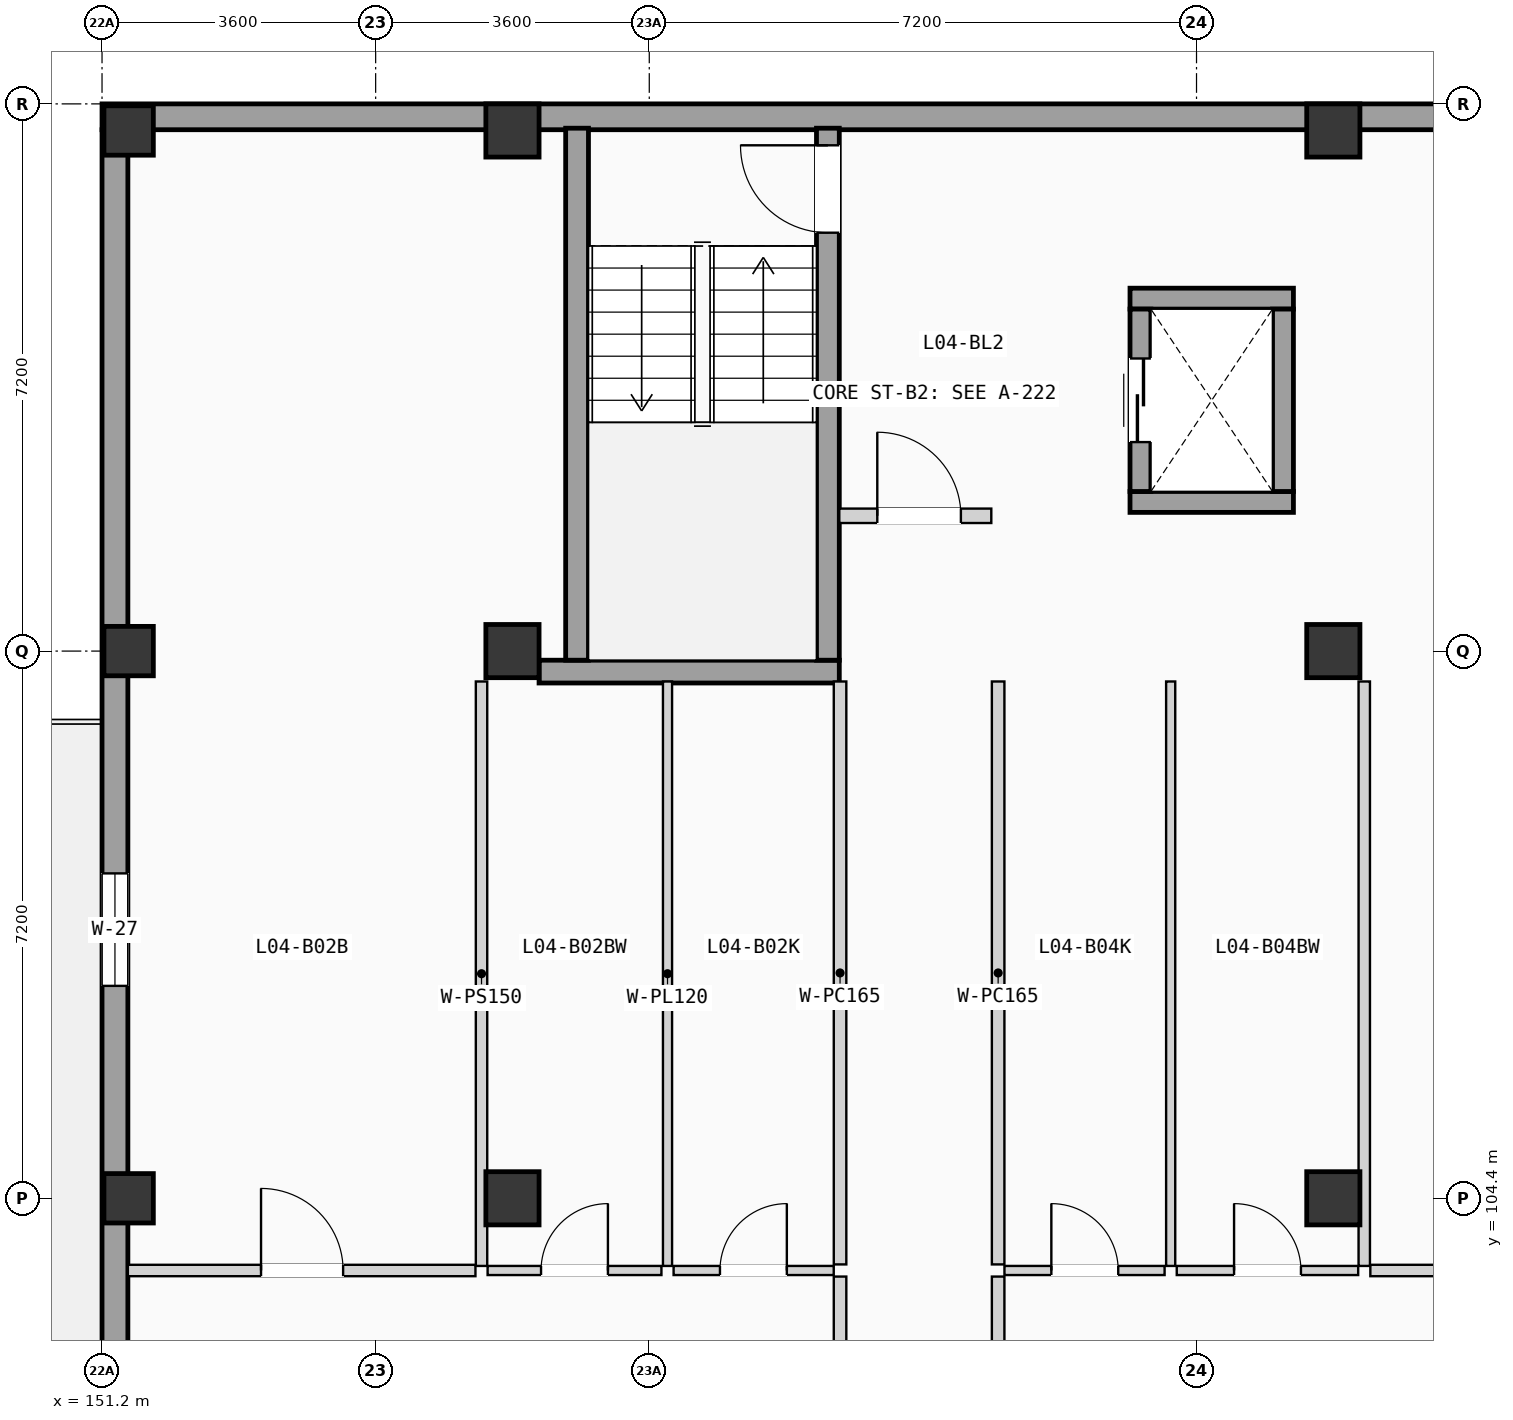
"""IFC4 building model, lengths in metres.
Left out: names, types, materials, properties, quantities, classifications, styles, units other than length and angle.
Written with IfcOpenShell. Run it as: python <this file> out.ifc"""

import sys

from ifc_helpers import new_model, si_unit, direction, frame, frame_2d, origin, origin_2d, place, context, subcontext, project, spatial, rectangle, extrude, element, fill, save


model = new_model("IFC4")
c1 = context("Model", 3, precision=1e-05, world=origin(), true_north=direction((0.0, 1.0)))
c2 = subcontext(c1, "Body", "Model", "MODEL_VIEW")
j1 = project(units=[si_unit("LENGTHUNIT", "METRE"), si_unit("PLANEANGLEUNIT", "RADIAN")], contexts=[c1])
p1 = place(None, origin())
s1 = spatial("IfcSite", under=j1, at=p1, CompositionType="ELEMENT")
p2 = place(p1, origin())
s2 = spatial("IfcBuilding", under=s1, at=p2, CompositionType="ELEMENT")
p3 = place(p2, frame((0.0, 0.0, 15.225)))
s3 = spatial("IfcBuildingStorey", under=s2, at=p3, CompositionType="ELEMENT", Elevation=15.225)
for number, where, z_axis, x_axis in (
    (1, (151.55, 104.4, 0.0), (0.0, 0.0, 1.0), (1.0, 0.0, 0.0)),
    (2, (151.55, 111.6, 0.0), (0.0, 0.0, 1.0), (1.0, 0.0, 0.0)),
    (3, (151.55, 118.45, 0.0), (0.0, 0.0, 1.0), (1.0, 0.0, 0.0)),
):
    element("IfcColumn", number, at=place(p3, frame(where, z_axis=z_axis, x_axis=x_axis)), inside=s3, PredefinedType="COLUMN", context=c2, shape_type="SweptSolid", body=[
        extrude(rectangle(XDim=0.65, YDim=0.65, at=origin_2d()), origin(), (0.0, 0.0, 1.0), 3.15),
    ])
for number, where, z_axis, x_axis in (
    (4, (156.6, 104.4, 0.0), (0.0, 0.0, 1.0), (1.0, 0.0, 0.0)),
    (5, (156.6, 111.6, 0.0), (0.0, 0.0, 1.0), (1.0, 0.0, 0.0)),
    (6, (156.6, 118.45, 0.0), (0.0, 0.0, 1.0), (1.0, 0.0, 0.0)),
    (7, (167.4, 104.4, 0.0), (0.0, 0.0, 1.0), (1.0, 0.0, 0.0)),
    (8, (167.4, 111.6, 0.0), (0.0, 0.0, 1.0), (1.0, 0.0, 0.0)),
    (9, (167.4, 118.45, 0.0), (0.0, 0.0, 1.0), (1.0, 0.0, 0.0)),
):
    element("IfcColumn", number, at=place(p3, frame(where, z_axis=z_axis, x_axis=x_axis)), inside=s3, PredefinedType="COLUMN", context=c2, shape_type="SweptSolid", body=[
        extrude(rectangle(XDim=0.7, YDim=0.7, at=origin_2d()), origin(), (0.0, 0.0, 1.0), 3.15),
    ])
p4 = place(p3, frame((151.2, 118.63, 0.0), z_axis=(0.0, 0.0, 1.0), x_axis=(1.0, 0.0, 0.0)))
e10 = element("IfcWall", 10, at=p4, inside=s3, PredefinedType="SOLIDWALL", context=c2, shape_type="SweptSolid", body=[
    extrude(rectangle(XDim=21.6, YDim=0.34, at=frame_2d((10.8, 0.0))), origin(), (0.0, 0.0, 1.0), 2.89),
])
p5 = place(p3, frame((151.37, 68.74, 0.0), z_axis=(0.0, 0.0, 1.0), x_axis=(0.0, 1.0, 0.0)))
e11 = element("IfcWall", 11, at=p5, inside=s3, PredefinedType="SOLIDWALL", context=c2, shape_type="SweptSolid", body=[
    extrude(rectangle(XDim=49.72, YDim=0.34, at=frame_2d((24.86, 0.0))), origin(), (0.0, 0.0, 1.0), 2.89),
])
p6 = place(p5, frame((15.765, 0.0, 0.0)))
e12 = element("IfcOpeningElement", 12, at=p6, cuts=e11, PredefinedType="OPENING", context=c2, shape_type="SweptSolid", body=[
    extrude(rectangle(XDim=0.95, YDim=2.15, at=frame_2d((0.475, 1.075))), frame((0.0, 0.18, 0.0), z_axis=(0.0, -1.0, 0.0), x_axis=(1.0, 0.0, 0.0)), (0.0, 0.0, 1.0), 0.36),
])
p7 = place(p5, frame((8.823, 0.0, 0.555)))
e13 = element("IfcOpeningElement", 13, at=p7, cuts=e11, PredefinedType="OPENING", context=c2, shape_type="SweptSolid", body=[
    extrude(rectangle(XDim=1.35, YDim=1.65, at=frame_2d((0.675, 0.825))), frame((0.0, 0.18, 0.0), z_axis=(0.0, -1.0, 0.0), x_axis=(1.0, 0.0, 0.0)), (0.0, 0.0, 1.0), 0.36),
])
p8 = place(p5, frame((18.76, 0.0, 0.85)))
e14 = element("IfcOpeningElement", 14, at=p8, cuts=e11, PredefinedType="OPENING", context=c2, shape_type="SweptSolid", body=[
    extrude(rectangle(XDim=0.95, YDim=1.2, at=frame_2d((0.475, 0.6))), frame((0.0, 0.18, 0.0), z_axis=(0.0, -1.0, 0.0), x_axis=(1.0, 0.0, 0.0)), (0.0, 0.0, 1.0), 0.36),
])
p9 = place(p5, frame((32.345, 0.0, 0.0)))
e15 = element("IfcOpeningElement", 15, at=p9, cuts=e11, PredefinedType="OPENING", context=c2, shape_type="SweptSolid", body=[
    extrude(rectangle(XDim=1.08, YDim=2.18, at=frame_2d((0.54, 1.09))), frame((0.0, 0.18, 0.0), z_axis=(0.0, -1.0, 0.0), x_axis=(1.0, 0.0, 0.0)), (0.0, 0.0, 1.0), 0.36),
])
p10 = place(p5, frame((24.422, 0.0, 0.9)))
e16 = element("IfcOpeningElement", 16, at=p10, cuts=e11, PredefinedType="OPENING", context=c2, shape_type="SweptSolid", body=[
    extrude(rectangle(XDim=1.48, YDim=1.2, at=frame_2d((0.74, 0.6))), frame((0.0, 0.18, 0.0), z_axis=(0.0, -1.0, 0.0), x_axis=(1.0, 0.0, 0.0)), (0.0, 0.0, 1.0), 0.36),
])
p11 = place(p5, frame((38.455, 0.0, 0.855)))
e17 = element("IfcOpeningElement", 17, at=p11, cuts=e11, PredefinedType="OPENING", context=c2, shape_type="SweptSolid", body=[
    extrude(rectangle(XDim=1.48, YDim=1.35, at=frame_2d((0.74, 0.675))), frame((0.0, 0.18, 0.0), z_axis=(0.0, -1.0, 0.0), x_axis=(1.0, 0.0, 0.0)), (0.0, 0.0, 1.0), 0.36),
])
p12 = place(p3, frame((156.95, 111.33, 0.0), z_axis=(0.0, 0.0, 1.0), x_axis=(1.0, 0.0, 0.0)))
e18 = element("IfcWall", 18, at=p12, inside=s3, PredefinedType="SHEAR", context=c2, shape_type="SweptSolid", body=[
    extrude(rectangle(XDim=3.95, YDim=0.3, at=frame_2d((1.975, 0.0))), origin(), (0.0, 0.0, 1.0), 2.89),
])
p13 = place(p3, frame((157.45, 111.48, 0.0), z_axis=(0.0, 0.0, 1.0), x_axis=(0.0, 1.0, 0.0)))
e19 = element("IfcWall", 19, at=p13, inside=s3, PredefinedType="SHEAR", context=c2, shape_type="SweptSolid", body=[
    extrude(rectangle(XDim=7.0, YDim=0.3, at=frame_2d((3.5, 0.0))), origin(), (0.0, 0.0, 1.0), 2.89),
])
p14 = place(p3, frame((160.75, 111.48, 0.0), z_axis=(0.0, 0.0, 1.0), x_axis=(0.0, 1.0, 0.0)))
e20 = element("IfcWall", 20, at=p14, inside=s3, PredefinedType="SHEAR", context=c2, shape_type="SweptSolid", body=[
    extrude(rectangle(XDim=7.0, YDim=0.3, at=frame_2d((3.5, 0.0))), origin(), (0.0, 0.0, 1.0), 2.89),
])
p15 = place(p14, frame((5.625, 0.0, 0.0)))
e21 = element("IfcOpeningElement", 21, at=p15, cuts=e20, PredefinedType="OPENING", context=c2, shape_type="SweptSolid", body=[
    extrude(rectangle(XDim=1.15, YDim=2.12, at=frame_2d((0.575, 1.06))), frame((0.0, 0.16, 0.0), z_axis=(0.0, -1.0, 0.0), x_axis=(1.0, 0.0, 0.0)), (0.0, 0.0, 1.0), 0.32),
])
for number, where, z_axis, x_axis in (
    (22, (164.725, 113.562, 0.0), (0.0, 0.0, 1.0), (1.0, 0.0, 0.0)),
    (23, (164.725, 116.238, 0.0), (0.0, 0.0, 1.0), (1.0, 0.0, 0.0)),
):
    element("IfcWall", number, at=place(p3, frame(where, z_axis=z_axis, x_axis=x_axis)), inside=s3, PredefinedType="SHEAR", context=c2, shape_type="SweptSolid", body=[
        extrude(rectangle(XDim=2.15, YDim=0.275, at=frame_2d((1.075, 0.0))), origin(), (0.0, 0.0, 1.0), 2.89),
    ])
p16 = place(p3, frame((164.863, 113.7, 0.0), z_axis=(0.0, 0.0, 1.0), x_axis=(0.0, 1.0, 0.0)))
e24 = element("IfcWall", 24, at=p16, inside=s3, PredefinedType="SHEAR", context=c2, shape_type="SweptSolid", body=[
    extrude(rectangle(XDim=2.4, YDim=0.275, at=frame_2d((1.2, 0.0))), origin(), (0.0, 0.0, 1.0), 2.89),
])
p17 = place(p16, frame((0.65, 0.0, 0.0)))
e25 = element("IfcOpeningElement", 25, at=p17, cuts=e24, PredefinedType="OPENING", context=c2, shape_type="SweptSolid", body=[
    extrude(rectangle(XDim=1.1, YDim=2.15, at=frame_2d((0.55, 1.075))), frame((0.0, 0.147, 0.0), z_axis=(0.0, -1.0, 0.0), x_axis=(1.0, 0.0, 0.0)), (0.0, 0.0, 1.0), 0.295),
])
p18 = place(p3, frame((166.738, 113.7, 0.0), z_axis=(0.0, 0.0, 1.0), x_axis=(0.0, 1.0, 0.0)))
e26 = element("IfcWall", 26, at=p18, inside=s3, PredefinedType="SHEAR", context=c2, shape_type="SweptSolid", body=[
    extrude(rectangle(XDim=2.4, YDim=0.275, at=frame_2d((1.2, 0.0))), origin(), (0.0, 0.0, 1.0), 2.89),
])
p19 = place(p3, frame((160.9, 113.38, 0.0), z_axis=(0.0, 0.0, 1.0), x_axis=(1.0, 0.0, 0.0)))
e27 = element("IfcWall", 27, at=p19, inside=s3, PredefinedType="PARTITIONING", context=c2, shape_type="SweptSolid", body=[
    extrude(rectangle(XDim=2.0, YDim=0.19, at=frame_2d((1.0, 0.0))), origin(), (0.0, 0.0, 1.0), 2.87),
])
p20 = place(p19, frame((0.5, 0.0, 0.0)))
e28 = element("IfcOpeningElement", 28, at=p20, cuts=e27, PredefinedType="OPENING", context=c2, shape_type="SweptSolid", body=[
    extrude(rectangle(XDim=1.1, YDim=2.12, at=frame_2d((0.55, 1.06))), frame((0.0, 0.105, 0.0), z_axis=(0.0, -1.0, 0.0), x_axis=(1.0, 0.0, 0.0)), (0.0, 0.0, 1.0), 0.21),
])
p21 = place(p3, frame((160.91, 98.23, 0.0), z_axis=(0.0, 0.0, 1.0), x_axis=(0.0, 1.0, 0.0)))
e29 = element("IfcWall", 29, at=p21, inside=s3, PredefinedType="PARTITIONING", context=c2, shape_type="SweptSolid", body=[
    extrude(rectangle(XDim=5.14, YDim=0.165, at=frame_2d((2.57, 0.0))), origin(), (0.0, 0.0, 1.0), 2.87),
])
p22 = place(p21, frame((2.065, 0.0, 0.0)))
e30 = element("IfcOpeningElement", 30, at=p22, cuts=e29, PredefinedType="OPENING", context=c2, shape_type="SweptSolid", body=[
    extrude(rectangle(XDim=1.01, YDim=2.11, at=frame_2d((0.505, 1.055))), frame((0.0, 0.093, 0.0), z_axis=(0.0, -1.0, 0.0), x_axis=(1.0, 0.0, 0.0)), (0.0, 0.0, 1.0), 0.185),
])
p23 = place(p3, frame((160.91, 103.53, 0.0), z_axis=(0.0, 0.0, 1.0), x_axis=(0.0, 1.0, 0.0)))
e31 = element("IfcWall", 31, at=p23, inside=s3, PredefinedType="PARTITIONING", context=c2, shape_type="SweptSolid", body=[
    extrude(rectangle(XDim=7.67, YDim=0.165, at=frame_2d((3.835, 0.0))), origin(), (0.0, 0.0, 1.0), 2.87),
])
p24 = place(p3, frame((162.99, 98.23, 0.0), z_axis=(0.0, 0.0, 1.0), x_axis=(0.0, 1.0, 0.0)))
e32 = element("IfcWall", 32, at=p24, inside=s3, PredefinedType="PARTITIONING", context=c2, shape_type="SweptSolid", body=[
    extrude(rectangle(XDim=5.14, YDim=0.165, at=frame_2d((2.57, 0.0))), origin(), (0.0, 0.0, 1.0), 2.87),
])
p25 = place(p24, frame((2.065, 0.0, 0.0)))
e33 = element("IfcOpeningElement", 33, at=p25, cuts=e32, PredefinedType="OPENING", context=c2, shape_type="SweptSolid", body=[
    extrude(rectangle(XDim=1.01, YDim=2.11, at=frame_2d((0.505, 1.055))), frame((0.0, 0.093, 0.0), z_axis=(0.0, -1.0, 0.0), x_axis=(1.0, 0.0, 0.0)), (0.0, 0.0, 1.0), 0.185),
])
p26 = place(p3, frame((162.99, 103.53, 0.0), z_axis=(0.0, 0.0, 1.0), x_axis=(0.0, 1.0, 0.0)))
e34 = element("IfcWall", 34, at=p26, inside=s3, PredefinedType="PARTITIONING", context=c2, shape_type="SweptSolid", body=[
    extrude(rectangle(XDim=7.67, YDim=0.165, at=frame_2d((3.835, 0.0))), origin(), (0.0, 0.0, 1.0), 2.87),
])
p27 = place(p3, frame((158.72, 103.45, 0.0), z_axis=(0.0, 0.0, 1.0), x_axis=(1.0, 0.0, 0.0)))
e35 = element("IfcWall", 35, at=p27, inside=s3, PredefinedType="PARTITIONING", context=c2, shape_type="SweptSolid", body=[
    extrude(rectangle(XDim=2.107, YDim=0.12, at=frame_2d((1.053, 0.0))), origin(), (0.0, 0.0, 1.0), 2.87),
])
p28 = place(p27, frame((0.61, 0.0, 0.0)))
e36 = element("IfcOpeningElement", 36, at=p28, cuts=e35, PredefinedType="OPENING", context=c2, shape_type="SweptSolid", body=[
    extrude(rectangle(XDim=0.88, YDim=2.02, at=frame_2d((0.44, 1.01))), frame((0.0, 0.07, 0.0), z_axis=(0.0, -1.0, 0.0), x_axis=(1.0, 0.0, 0.0)), (0.0, 0.0, 1.0), 0.14),
])
p29 = place(p3, frame((151.54, 103.45, 0.0), z_axis=(0.0, 0.0, 1.0), x_axis=(1.0, 0.0, 0.0)))
e37 = element("IfcWall", 37, at=p29, inside=s3, PredefinedType="PARTITIONING", context=c2, shape_type="SweptSolid", body=[
    extrude(rectangle(XDim=4.573, YDim=0.15, at=frame_2d((2.287, 0.0))), origin(), (0.0, 0.0, 1.0), 2.87),
])
p30 = place(p29, frame((1.752, 0.0, 0.0)))
e38 = element("IfcOpeningElement", 38, at=p30, cuts=e37, PredefinedType="OPENING", context=c2, shape_type="SweptSolid", body=[
    extrude(rectangle(XDim=1.08, YDim=2.1, at=frame_2d((0.54, 1.05))), frame((0.0, 0.085, 0.0), z_axis=(0.0, -1.0, 0.0), x_axis=(1.0, 0.0, 0.0)), (0.0, 0.0, 1.0), 0.17),
])
p31 = place(p3, frame((156.273, 103.45, 0.0), z_axis=(0.0, 0.0, 1.0), x_axis=(1.0, 0.0, 0.0)))
e39 = element("IfcWall", 39, at=p31, inside=s3, PredefinedType="PARTITIONING", context=c2, shape_type="SweptSolid", body=[
    extrude(rectangle(XDim=2.287, YDim=0.12, at=frame_2d((1.144, 0.0))), origin(), (0.0, 0.0, 1.0), 2.87),
])
p32 = place(p31, frame((0.703, 0.0, 0.0)))
e40 = element("IfcOpeningElement", 40, at=p32, cuts=e39, PredefinedType="OPENING", context=c2, shape_type="SweptSolid", body=[
    extrude(rectangle(XDim=0.88, YDim=2.02, at=frame_2d((0.44, 1.01))), frame((0.0, 0.07, 0.0), z_axis=(0.0, -1.0, 0.0), x_axis=(1.0, 0.0, 0.0)), (0.0, 0.0, 1.0), 0.14),
])
p33 = place(p3, frame((158.64, 103.51, 0.0), z_axis=(0.0, 0.0, 1.0), x_axis=(0.0, 1.0, 0.0)))
e41 = element("IfcWall", 41, at=p33, inside=s3, PredefinedType="PARTITIONING", context=c2, shape_type="SweptSolid", body=[
    extrude(rectangle(XDim=7.69, YDim=0.12, at=frame_2d((3.845, 0.0))), origin(), (0.0, 0.0, 1.0), 2.87),
])
p34 = place(p3, frame((156.193, 103.51, 0.0), z_axis=(0.0, 0.0, 1.0), x_axis=(0.0, 1.0, 0.0)))
e42 = element("IfcWall", 42, at=p34, inside=s3, PredefinedType="PARTITIONING", context=c2, shape_type="SweptSolid", body=[
    extrude(rectangle(XDim=7.69, YDim=0.15, at=frame_2d((3.845, 0.0))), origin(), (0.0, 0.0, 1.0), 2.87),
])
p35 = place(p3, frame((163.073, 103.45, 0.0), z_axis=(0.0, 0.0, 1.0), x_axis=(1.0, 0.0, 0.0)))
e43 = element("IfcWall", 43, at=p35, inside=s3, PredefinedType="PARTITIONING", context=c2, shape_type="SweptSolid", body=[
    extrude(rectangle(XDim=2.107, YDim=0.12, at=frame_2d((1.053, 0.0))), origin(), (0.0, 0.0, 1.0), 2.87),
])
p36 = place(p35, frame((0.617, 0.0, 0.0)))
e44 = element("IfcOpeningElement", 44, at=p36, cuts=e43, PredefinedType="OPENING", context=c2, shape_type="SweptSolid", body=[
    extrude(rectangle(XDim=0.88, YDim=2.02, at=frame_2d((0.44, 1.01))), frame((0.0, 0.07, 0.0), z_axis=(0.0, -1.0, 0.0), x_axis=(1.0, 0.0, 0.0)), (0.0, 0.0, 1.0), 0.14),
])
p37 = place(p3, frame((167.887, 103.45, 0.0), z_axis=(0.0, 0.0, 1.0), x_axis=(1.0, 0.0, 0.0)))
e45 = element("IfcWall", 45, at=p37, inside=s3, PredefinedType="PARTITIONING", context=c2, shape_type="SweptSolid", body=[
    extrude(rectangle(XDim=4.573, YDim=0.15, at=frame_2d((2.287, 0.0))), origin(), (0.0, 0.0, 1.0), 2.87),
])
p38 = place(p37, frame((1.761, 0.0, 0.0)))
e46 = element("IfcOpeningElement", 46, at=p38, cuts=e45, PredefinedType="OPENING", context=c2, shape_type="SweptSolid", body=[
    extrude(rectangle(XDim=1.04, YDim=2.08, at=frame_2d((0.52, 1.04))), frame((0.0, 0.085, 0.0), z_axis=(0.0, -1.0, 0.0), x_axis=(1.0, 0.0, 0.0)), (0.0, 0.0, 1.0), 0.17),
])
p39 = place(p3, frame((165.34, 103.45, 0.0), z_axis=(0.0, 0.0, 1.0), x_axis=(1.0, 0.0, 0.0)))
e47 = element("IfcWall", 47, at=p39, inside=s3, PredefinedType="PARTITIONING", context=c2, shape_type="SweptSolid", body=[
    extrude(rectangle(XDim=2.387, YDim=0.12, at=frame_2d((1.193, 0.0))), origin(), (0.0, 0.0, 1.0), 2.87),
])
p40 = place(p39, frame((0.754, 0.0, 0.0)))
e48 = element("IfcOpeningElement", 48, at=p40, cuts=e47, PredefinedType="OPENING", context=c2, shape_type="SweptSolid", body=[
    extrude(rectangle(XDim=0.88, YDim=2.02, at=frame_2d((0.44, 1.01))), frame((0.0, 0.07, 0.0), z_axis=(0.0, -1.0, 0.0), x_axis=(1.0, 0.0, 0.0)), (0.0, 0.0, 1.0), 0.14),
])
p41 = place(p3, frame((165.26, 103.51, 0.0), z_axis=(0.0, 0.0, 1.0), x_axis=(0.0, 1.0, 0.0)))
e49 = element("IfcWall", 49, at=p41, inside=s3, PredefinedType="PARTITIONING", context=c2, shape_type="SweptSolid", body=[
    extrude(rectangle(XDim=7.69, YDim=0.12, at=frame_2d((3.845, 0.0))), origin(), (0.0, 0.0, 1.0), 2.87),
])
p42 = place(p3, frame((167.807, 103.51, 0.0), z_axis=(0.0, 0.0, 1.0), x_axis=(0.0, 1.0, 0.0)))
e50 = element("IfcWall", 50, at=p42, inside=s3, PredefinedType="PARTITIONING", context=c2, shape_type="SweptSolid", body=[
    extrude(rectangle(XDim=7.69, YDim=0.15, at=frame_2d((3.845, 0.0))), origin(), (0.0, 0.0, 1.0), 2.87),
])
p43 = place(p11, origin())
e51 = element("IfcWindow", 51, at=p43, inside=s3, PartitioningType="SINGLE_PANEL", PredefinedType="WINDOW", context=c2, shape_type="SweptSolid", body=[
    extrude(rectangle(XDim=1.48, YDim=1.35, at=frame_2d((0.74, 0.675))), frame((0.0, 0.03, 0.0), z_axis=(0.0, -1.0, 0.0), x_axis=(1.0, 0.0, 0.0)), (0.0, 0.0, 1.0), 0.06),
])
fill(e17, e51)
p44 = place(p15, origin())
e52 = element("IfcDoor", 52, at=p44, inside=s3, OperationType="SINGLE_SWING_RIGHT", PredefinedType="DOOR", context=c2, shape_type="SweptSolid", body=[
    extrude(rectangle(XDim=1.15, YDim=2.12, at=frame_2d((0.575, 1.06))), frame((0.0, 0.025, 0.0), z_axis=(0.0, -1.0, 0.0), x_axis=(1.0, 0.0, 0.0)), (0.0, 0.0, 1.0), 0.05),
])
fill(e21, e52)
p45 = place(p17, origin())
e53 = element("IfcDoor", 53, at=p45, inside=s3, OperationType="SLIDING_TO_LEFT", PredefinedType="DOOR", context=c2, shape_type="SweptSolid", body=[
    extrude(rectangle(XDim=1.1, YDim=2.15, at=frame_2d((0.55, 1.075))), frame((0.0, 0.025, 0.0), z_axis=(0.0, -1.0, 0.0), x_axis=(1.0, 0.0, 0.0)), (0.0, 0.0, 1.0), 0.05),
])
fill(e25, e53)
p46 = place(p20, origin())
e54 = element("IfcDoor", 54, at=p46, inside=s3, OperationType="SINGLE_SWING_LEFT", PredefinedType="DOOR", context=c2, shape_type="SweptSolid", body=[
    extrude(rectangle(XDim=1.1, YDim=2.12, at=frame_2d((0.55, 1.06))), frame((0.0, 0.025, 0.0), z_axis=(0.0, -1.0, 0.0), x_axis=(1.0, 0.0, 0.0)), (0.0, 0.0, 1.0), 0.05),
])
fill(e28, e54)
p47 = place(p28, origin())
e55 = element("IfcDoor", 55, at=p47, inside=s3, OperationType="SINGLE_SWING_RIGHT", PredefinedType="DOOR", context=c2, shape_type="SweptSolid", body=[
    extrude(rectangle(XDim=0.88, YDim=2.02, at=frame_2d((0.44, 1.01))), frame((0.0, 0.025, 0.0), z_axis=(0.0, -1.0, 0.0), x_axis=(1.0, 0.0, 0.0)), (0.0, 0.0, 1.0), 0.05),
])
fill(e36, e55)
p48 = place(p30, origin())
e56 = element("IfcDoor", 56, at=p48, inside=s3, OperationType="SINGLE_SWING_LEFT", PredefinedType="DOOR", context=c2, shape_type="SweptSolid", body=[
    extrude(rectangle(XDim=1.08, YDim=2.1, at=frame_2d((0.54, 1.05))), frame((0.0, 0.025, 0.0), z_axis=(0.0, -1.0, 0.0), x_axis=(1.0, 0.0, 0.0)), (0.0, 0.0, 1.0), 0.05),
])
fill(e38, e56)
p49 = place(p32, origin())
e57 = element("IfcDoor", 57, at=p49, inside=s3, OperationType="SINGLE_SWING_RIGHT", PredefinedType="DOOR", context=c2, shape_type="SweptSolid", body=[
    extrude(rectangle(XDim=0.88, YDim=2.02, at=frame_2d((0.44, 1.01))), frame((0.0, 0.025, 0.0), z_axis=(0.0, -1.0, 0.0), x_axis=(1.0, 0.0, 0.0)), (0.0, 0.0, 1.0), 0.05),
])
fill(e40, e57)
p50 = place(p36, origin())
e58 = element("IfcDoor", 58, at=p50, inside=s3, OperationType="SINGLE_SWING_LEFT", PredefinedType="DOOR", context=c2, shape_type="SweptSolid", body=[
    extrude(rectangle(XDim=0.88, YDim=2.02, at=frame_2d((0.44, 1.01))), frame((0.0, 0.025, 0.0), z_axis=(0.0, -1.0, 0.0), x_axis=(1.0, 0.0, 0.0)), (0.0, 0.0, 1.0), 0.05),
])
fill(e44, e58)
p51 = place(p40, origin())
e59 = element("IfcDoor", 59, at=p51, inside=s3, OperationType="SINGLE_SWING_LEFT", PredefinedType="DOOR", context=c2, shape_type="SweptSolid", body=[
    extrude(rectangle(XDim=0.88, YDim=2.02, at=frame_2d((0.44, 1.01))), frame((0.0, 0.025, 0.0), z_axis=(0.0, -1.0, 0.0), x_axis=(1.0, 0.0, 0.0)), (0.0, 0.0, 1.0), 0.05),
])
fill(e48, e59)
save(model, sys.argv[1])
